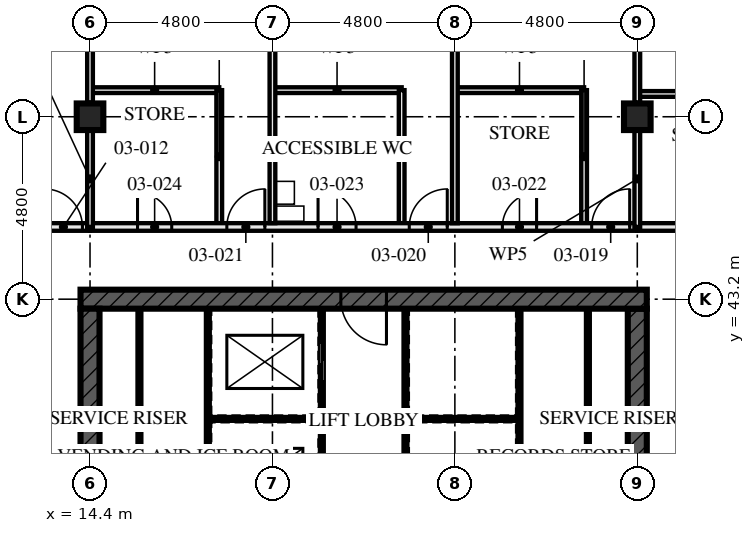
"""IFC4 building model, lengths in metres.
Left out: names, types, materials, properties, quantities, classifications, styles, units other than length and angle.
Written with IfcOpenShell. Run it as: python <this file> out.ifc"""

import sys

from ifc_helpers import new_model, si_unit, direction, frame, frame_2d, origin, origin_2d, place, context, subcontext, project, spatial, rectangle, hollow_rectangle, extrude, element, fill, save


model = new_model("IFC4")
c1 = context("Model", 3, precision=1e-05, world=origin(), true_north=direction((0.0, 1.0)))
c2 = subcontext(c1, "Body", "Model", "MODEL_VIEW")
j1 = project(units=[si_unit("LENGTHUNIT", "METRE"), si_unit("PLANEANGLEUNIT", "RADIAN")], contexts=[c1])
p1 = place(None, origin())
s1 = spatial("IfcSite", under=j1, at=p1, CompositionType="ELEMENT")
p2 = place(p1, origin())
s2 = spatial("IfcBuilding", under=s1, at=p2, CompositionType="ELEMENT")
p3 = place(p2, frame((0.0, 0.0, 13.5)))
s3 = spatial("IfcBuildingStorey", under=s2, at=p3, CompositionType="ELEMENT", Elevation=13.5)
for number, where, z_axis, x_axis in (
    (1, (14.4, 48.0, 0.0), (0.0, 0.0, 1.0), (1.0, 0.0, 0.0)),
    (2, (28.8, 48.0, 0.0), (0.0, 0.0, 1.0), (1.0, 0.0, 0.0)),
):
    element("IfcColumn", number, at=place(p3, frame(where, z_axis=z_axis, x_axis=x_axis)), inside=s3, PredefinedType="COLUMN", context=c2, shape_type="SweptSolid", body=[
        extrude(hollow_rectangle(XDim=0.7, YDim=0.7, WallThickness=0.06, at=origin_2d()), origin(), (0.0, 0.0, 1.0), 4.5),
    ])
p4 = place(p3, frame((29.05, 43.2, -0.17), z_axis=(0.0, 0.0, 1.0), x_axis=(-1.0, 0.0, 0.0)))
e3 = element("IfcWall", 3, at=p4, inside=s3, PredefinedType="SHEAR", context=c2, shape_type="SweptSolid", body=[
    extrude(rectangle(XDim=14.9, YDim=0.5, at=frame_2d((7.45, 0.0))), origin(), (0.0, 0.0, 1.0), 4.5),
])
p5 = place(p4, frame((6.85, 0.0, 0.17)))
e4 = element("IfcOpeningElement", 4, at=p5, cuts=e3, PredefinedType="OPENING", context=c2, shape_type="SweptSolid", body=[
    extrude(rectangle(XDim=1.2, YDim=2.1, at=frame_2d((0.6, 1.05))), frame((0.0, 0.26, 0.0), z_axis=(0.0, -1.0, 0.0), x_axis=(1.0, 0.0, 0.0)), (0.0, 0.0, 1.0), 0.521),
])
p6 = place(p3, frame((14.4, 42.95, -0.17), z_axis=(0.0, 0.0, 1.0), x_axis=(0.0, -1.0, 0.0)))
e5 = element("IfcWall", 5, at=p6, inside=s3, PredefinedType="SHEAR", context=c2, shape_type="SweptSolid", body=[
    extrude(rectangle(XDim=13.9, YDim=0.5, at=frame_2d((6.95, 0.0))), origin(), (0.0, 0.0, 1.0), 4.5),
])
p7 = place(p6, frame((6.35, 0.0, 0.17)))
e6 = element("IfcOpeningElement", 6, at=p7, cuts=e5, PredefinedType="OPENING", context=c2, shape_type="SweptSolid", body=[
    extrude(rectangle(XDim=1.2, YDim=2.1, at=frame_2d((0.6, 1.05))), frame((0.0, 0.26, 0.0), z_axis=(0.0, -1.0, 0.0), x_axis=(1.0, 0.0, 0.0)), (0.0, 0.0, 1.0), 0.521),
])
p8 = place(p3, frame((28.8, 29.05, -0.17), z_axis=(0.0, 0.0, 1.0), x_axis=(0.0, 1.0, 0.0)))
e7 = element("IfcWall", 7, at=p8, inside=s3, PredefinedType="SHEAR", context=c2, shape_type="SweptSolid", body=[
    extrude(rectangle(XDim=13.9, YDim=0.5, at=frame_2d((6.95, 0.0))), origin(), (0.0, 0.0, 1.0), 4.5),
])
p9 = place(p8, frame((6.35, 0.0, 0.17)))
e8 = element("IfcOpeningElement", 8, at=p9, cuts=e7, PredefinedType="OPENING", context=c2, shape_type="SweptSolid", body=[
    extrude(rectangle(XDim=1.2, YDim=2.1, at=frame_2d((0.6, 1.05))), frame((0.0, 0.26, 0.0), z_axis=(0.0, -1.0, 0.0), x_axis=(1.0, 0.0, 0.0)), (0.0, 0.0, 1.0), 0.521),
])
p10 = place(p3, frame((14.4, 45.1, 0.0), z_axis=(0.0, 0.0, 1.0), x_axis=(-1.0, 0.0, 0.0)))
e9 = element("IfcWall", 9, at=p10, inside=s3, PredefinedType="PARTITIONING", context=c2, shape_type="SweptSolid", body=[
    extrude(rectangle(XDim=14.855, YDim=0.2, at=frame_2d((7.427, 0.0))), origin(), (0.0, 0.0, 1.0), 3.32),
])
p11 = place(p10, frame((0.2, 0.0, 0.0)))
e10 = element("IfcOpeningElement", 10, at=p11, cuts=e9, PredefinedType="OPENING", context=c2, shape_type="SweptSolid", body=[
    extrude(rectangle(XDim=1.0, YDim=2.4, at=frame_2d((0.5, 1.2))), frame((0.0, 0.111, 0.0), z_axis=(0.0, -1.0, 0.0), x_axis=(1.0, 0.0, 0.0)), (0.0, 0.0, 1.0), 0.221),
])
p12 = place(p10, frame((5.0, 0.0, 0.0)))
e11 = element("IfcOpeningElement", 11, at=p12, cuts=e9, PredefinedType="OPENING", context=c2, shape_type="SweptSolid", body=[
    extrude(rectangle(XDim=1.0, YDim=2.4, at=frame_2d((0.5, 1.2))), frame((0.0, 0.111, 0.0), z_axis=(0.0, -1.0, 0.0), x_axis=(1.0, 0.0, 0.0)), (0.0, 0.0, 1.0), 0.221),
])
p13 = place(p10, frame((9.8, 0.0, 0.0)))
e12 = element("IfcOpeningElement", 12, at=p13, cuts=e9, PredefinedType="OPENING", context=c2, shape_type="SweptSolid", body=[
    extrude(rectangle(XDim=1.0, YDim=2.4, at=frame_2d((0.5, 1.2))), frame((0.0, 0.111, 0.0), z_axis=(0.0, -1.0, 0.0), x_axis=(1.0, 0.0, 0.0)), (0.0, 0.0, 1.0), 0.221),
])
p14 = place(p10, frame((2.65, 0.0, 0.0)))
e13 = element("IfcOpeningElement", 13, at=p14, cuts=e9, PredefinedType="OPENING", context=c2, shape_type="SweptSolid", body=[
    extrude(rectangle(XDim=0.9, YDim=2.1, at=frame_2d((0.45, 1.05))), frame((0.0, 0.111, 0.0), z_axis=(0.0, -1.0, 0.0), x_axis=(1.0, 0.0, 0.0)), (0.0, 0.0, 1.0), 0.221),
])
p15 = place(p10, frame((7.4, 0.0, 0.0)))
e14 = element("IfcOpeningElement", 14, at=p15, cuts=e9, PredefinedType="OPENING", context=c2, shape_type="SweptSolid", body=[
    extrude(rectangle(XDim=1.0, YDim=2.1, at=frame_2d((0.5, 1.05))), frame((0.0, 0.111, 0.0), z_axis=(0.0, -1.0, 0.0), x_axis=(1.0, 0.0, 0.0)), (0.0, 0.0, 1.0), 0.221),
])
p16 = place(p10, frame((12.25, 0.0, 0.0)))
e15 = element("IfcOpeningElement", 15, at=p16, cuts=e9, PredefinedType="OPENING", context=c2, shape_type="SweptSolid", body=[
    extrude(rectangle(XDim=0.9, YDim=2.1, at=frame_2d((0.45, 1.05))), frame((0.0, 0.111, 0.0), z_axis=(0.0, -1.0, 0.0), x_axis=(1.0, 0.0, 0.0)), (0.0, 0.0, 1.0), 0.221),
])
p17 = place(p3, frame((27.4, 48.7, 0.0), z_axis=(0.0, 0.0, 1.0), x_axis=(0.0, -1.0, 0.0)))
e16 = element("IfcWall", 16, at=p17, inside=s3, PredefinedType="PARTITIONING", context=c2, shape_type="SweptSolid", body=[
    extrude(rectangle(XDim=3.5, YDim=0.15, at=frame_2d((1.75, 0.0))), origin(), (0.0, 0.0, 1.0), 3.55),
])
p18 = place(p3, frame((27.4, 48.7, 0.0), z_axis=(0.0, 0.0, 1.0), x_axis=(-1.0, 0.0, 0.0)))
e17 = element("IfcWall", 17, at=p18, inside=s3, PredefinedType="PARTITIONING", context=c2, shape_type="SweptSolid", body=[
    extrude(rectangle(XDim=3.4, YDim=0.15, at=frame_2d((1.7, 0.0))), origin(), (0.0, 0.0, 1.0), 4.33),
])
p19 = place(p3, frame((22.6, 48.7, 0.0), z_axis=(0.0, 0.0, 1.0), x_axis=(0.0, -1.0, 0.0)))
e18 = element("IfcWall", 18, at=p19, inside=s3, PredefinedType="PARTITIONING", context=c2, shape_type="SweptSolid", body=[
    extrude(rectangle(XDim=3.5, YDim=0.15, at=frame_2d((1.75, 0.0))), origin(), (0.0, 0.0, 1.0), 3.55),
])
p20 = place(p3, frame((22.6, 48.7, 0.0), z_axis=(0.0, 0.0, 1.0), x_axis=(-1.0, 0.0, 0.0)))
e19 = element("IfcWall", 19, at=p20, inside=s3, PredefinedType="PARTITIONING", context=c2, shape_type="SweptSolid", body=[
    extrude(rectangle(XDim=3.4, YDim=0.15, at=frame_2d((1.7, 0.0))), origin(), (0.0, 0.0, 1.0), 4.33),
])
p21 = place(p3, frame((17.8, 48.7, 0.0), z_axis=(0.0, 0.0, 1.0), x_axis=(0.0, -1.0, 0.0)))
e20 = element("IfcWall", 20, at=p21, inside=s3, PredefinedType="PARTITIONING", context=c2, shape_type="SweptSolid", body=[
    extrude(rectangle(XDim=3.5, YDim=0.15, at=frame_2d((1.75, 0.0))), origin(), (0.0, 0.0, 1.0), 3.55),
])
p22 = place(p3, frame((17.8, 48.7, 0.0), z_axis=(0.0, 0.0, 1.0), x_axis=(-1.0, 0.0, 0.0)))
e21 = element("IfcWall", 21, at=p22, inside=s3, PredefinedType="PARTITIONING", context=c2, shape_type="SweptSolid", body=[
    extrude(rectangle(XDim=3.4, YDim=0.15, at=frame_2d((1.7, 0.0))), origin(), (0.0, 0.0, 1.0), 4.33),
])
for number, where, z_axis, x_axis in (
    (22, (24.0, 57.255, 0.0), (0.0, 0.0, 1.0), (0.0, -1.0, 0.0)),
    (23, (19.2, 57.255, 0.0), (0.0, 0.0, 1.0), (0.0, -1.0, 0.0)),
):
    element("IfcWall", number, at=place(p3, frame(where, z_axis=z_axis, x_axis=x_axis)), inside=s3, PredefinedType="PARTITIONING", context=c2, shape_type="SweptSolid", body=[
        extrude(rectangle(XDim=12.055, YDim=0.15, at=frame_2d((6.027, 0.0))), origin(), (0.0, 0.0, 1.0), 3.55),
    ])
p23 = place(p3, frame((28.8, 45.1, 0.0), z_axis=(0.0, 0.0, 1.0), x_axis=(-1.0, 0.0, 0.0)))
e24 = element("IfcWall", 24, at=p23, inside=s3, PredefinedType="PARTITIONING", context=c2, shape_type="SweptSolid", body=[
    extrude(rectangle(XDim=14.4, YDim=0.2, at=frame_2d((7.2, 0.0))), origin(), (0.0, 0.0, 1.0), 4.33),
])
p24 = place(p23, frame((0.2, 0.0, 0.0)))
e25 = element("IfcOpeningElement", 25, at=p24, cuts=e24, PredefinedType="OPENING", context=c2, shape_type="SweptSolid", body=[
    extrude(rectangle(XDim=1.0, YDim=2.4, at=frame_2d((0.5, 1.2))), frame((0.0, 0.111, 0.0), z_axis=(0.0, -1.0, 0.0), x_axis=(1.0, 0.0, 0.0)), (0.0, 0.0, 1.0), 0.221),
])
p25 = place(p23, frame((5.0, 0.0, 0.0)))
e26 = element("IfcOpeningElement", 26, at=p25, cuts=e24, PredefinedType="OPENING", context=c2, shape_type="SweptSolid", body=[
    extrude(rectangle(XDim=1.0, YDim=2.4, at=frame_2d((0.5, 1.2))), frame((0.0, 0.111, 0.0), z_axis=(0.0, -1.0, 0.0), x_axis=(1.0, 0.0, 0.0)), (0.0, 0.0, 1.0), 0.221),
])
p26 = place(p23, frame((9.8, 0.0, 0.0)))
e27 = element("IfcOpeningElement", 27, at=p26, cuts=e24, PredefinedType="OPENING", context=c2, shape_type="SweptSolid", body=[
    extrude(rectangle(XDim=1.0, YDim=2.4, at=frame_2d((0.5, 1.2))), frame((0.0, 0.111, 0.0), z_axis=(0.0, -1.0, 0.0), x_axis=(1.0, 0.0, 0.0)), (0.0, 0.0, 1.0), 0.221),
])
p27 = place(p23, frame((2.65, 0.0, 0.0)))
e28 = element("IfcOpeningElement", 28, at=p27, cuts=e24, PredefinedType="OPENING", context=c2, shape_type="SweptSolid", body=[
    extrude(rectangle(XDim=0.9, YDim=2.1, at=frame_2d((0.45, 1.05))), frame((0.0, 0.111, 0.0), z_axis=(0.0, -1.0, 0.0), x_axis=(1.0, 0.0, 0.0)), (0.0, 0.0, 1.0), 0.221),
])
p28 = place(p23, frame((7.4, 0.0, 0.0)))
e29 = element("IfcOpeningElement", 29, at=p28, cuts=e24, PredefinedType="OPENING", context=c2, shape_type="SweptSolid", body=[
    extrude(rectangle(XDim=1.0, YDim=2.1, at=frame_2d((0.5, 1.05))), frame((0.0, 0.111, 0.0), z_axis=(0.0, -1.0, 0.0), x_axis=(1.0, 0.0, 0.0)), (0.0, 0.0, 1.0), 0.221),
])
p29 = place(p23, frame((12.25, 0.0, 0.0)))
e30 = element("IfcOpeningElement", 30, at=p29, cuts=e24, PredefinedType="OPENING", context=c2, shape_type="SweptSolid", body=[
    extrude(rectangle(XDim=0.9, YDim=2.1, at=frame_2d((0.45, 1.05))), frame((0.0, 0.111, 0.0), z_axis=(0.0, -1.0, 0.0), x_axis=(1.0, 0.0, 0.0)), (0.0, 0.0, 1.0), 0.221),
])
p30 = place(p3, frame((32.2, 48.6, 0.0), z_axis=(0.0, 0.0, 1.0), x_axis=(-1.0, 0.0, 0.0)))
e31 = element("IfcWall", 31, at=p30, inside=s3, PredefinedType="PARTITIONING", context=c2, shape_type="SweptSolid", body=[
    extrude(rectangle(XDim=3.4, YDim=0.15, at=frame_2d((1.7, 0.0))), origin(), (0.0, 0.0, 1.0), 4.33),
])
p31 = place(p3, frame((43.655, 45.1, 0.0), z_axis=(0.0, 0.0, 1.0), x_axis=(-1.0, 0.0, 0.0)))
e32 = element("IfcWall", 32, at=p31, inside=s3, PredefinedType="PARTITIONING", context=c2, shape_type="SweptSolid", body=[
    extrude(rectangle(XDim=14.855, YDim=0.2, at=frame_2d((7.427, 0.0))), origin(), (0.0, 0.0, 1.0), 3.32),
])
p32 = place(p31, frame((0.655, 0.0, 0.0)))
e33 = element("IfcOpeningElement", 33, at=p32, cuts=e32, PredefinedType="OPENING", context=c2, shape_type="SweptSolid", body=[
    extrude(rectangle(XDim=1.0, YDim=2.4, at=frame_2d((0.5, 1.2))), frame((0.0, 0.111, 0.0), z_axis=(0.0, -1.0, 0.0), x_axis=(1.0, 0.0, 0.0)), (0.0, 0.0, 1.0), 0.221),
])
p33 = place(p31, frame((5.455, 0.0, 0.0)))
e34 = element("IfcOpeningElement", 34, at=p33, cuts=e32, PredefinedType="OPENING", context=c2, shape_type="SweptSolid", body=[
    extrude(rectangle(XDim=1.0, YDim=2.4, at=frame_2d((0.5, 1.2))), frame((0.0, 0.111, 0.0), z_axis=(0.0, -1.0, 0.0), x_axis=(1.0, 0.0, 0.0)), (0.0, 0.0, 1.0), 0.221),
])
p34 = place(p31, frame((10.255, 0.0, 0.0)))
e35 = element("IfcOpeningElement", 35, at=p34, cuts=e32, PredefinedType="OPENING", context=c2, shape_type="SweptSolid", body=[
    extrude(rectangle(XDim=1.0, YDim=2.4, at=frame_2d((0.5, 1.2))), frame((0.0, 0.111, 0.0), z_axis=(0.0, -1.0, 0.0), x_axis=(1.0, 0.0, 0.0)), (0.0, 0.0, 1.0), 0.221),
])
p35 = place(p31, frame((3.105, 0.0, 0.0)))
e36 = element("IfcOpeningElement", 36, at=p35, cuts=e32, PredefinedType="OPENING", context=c2, shape_type="SweptSolid", body=[
    extrude(rectangle(XDim=0.9, YDim=2.1, at=frame_2d((0.45, 1.05))), frame((0.0, 0.111, 0.0), z_axis=(0.0, -1.0, 0.0), x_axis=(1.0, 0.0, 0.0)), (0.0, 0.0, 1.0), 0.221),
])
p36 = place(p31, frame((7.855, 0.0, 0.0)))
e37 = element("IfcOpeningElement", 37, at=p36, cuts=e32, PredefinedType="OPENING", context=c2, shape_type="SweptSolid", body=[
    extrude(rectangle(XDim=1.0, YDim=2.1, at=frame_2d((0.5, 1.05))), frame((0.0, 0.111, 0.0), z_axis=(0.0, -1.0, 0.0), x_axis=(1.0, 0.0, 0.0)), (0.0, 0.0, 1.0), 0.221),
])
p37 = place(p31, frame((12.705, 0.0, 0.0)))
e38 = element("IfcOpeningElement", 38, at=p37, cuts=e32, PredefinedType="OPENING", context=c2, shape_type="SweptSolid", body=[
    extrude(rectangle(XDim=0.9, YDim=2.1, at=frame_2d((0.45, 1.05))), frame((0.0, 0.111, 0.0), z_axis=(0.0, -1.0, 0.0), x_axis=(1.0, 0.0, 0.0)), (0.0, 0.0, 1.0), 0.221),
])
for number, where, z_axis, x_axis in (
    (39, (15.7, 37.15, 0.0), (0.0, 0.0, 1.0), (0.0, 1.0, 0.0)),
    (40, (27.5, 37.15, 0.0), (0.0, 0.0, 1.0), (0.0, 1.0, 0.0)),
):
    element("IfcWall", number, at=place(p3, frame(where, z_axis=z_axis, x_axis=x_axis)), inside=s3, PredefinedType="SOLIDWALL", context=c2, shape_type="SweptSolid", body=[
        extrude(rectangle(XDim=5.8, YDim=0.1, at=frame_2d((2.9, 0.0))), origin(), (0.0, 0.0, 1.0), 4.33),
    ])
p38 = place(p3, frame((20.5, 37.15, 0.0), z_axis=(0.0, 0.0, 1.0), x_axis=(0.0, 1.0, 0.0)))
e41 = element("IfcWall", 41, at=p38, inside=s3, PredefinedType="SOLIDWALL", context=c2, shape_type="SweptSolid", body=[
    extrude(rectangle(XDim=5.8, YDim=0.1, at=frame_2d((2.9, 0.0))), origin(), (0.0, 0.0, 1.0), 4.33),
])
p39 = place(p38, frame((0.925, 0.0, 0.0)))
e42 = element("IfcOpeningElement", 42, at=p39, cuts=e41, PredefinedType="OPENING", context=c2, shape_type="SweptSolid", body=[
    extrude(rectangle(XDim=1.0, YDim=2.1, at=frame_2d((0.5, 1.05))), frame((0.0, 0.061, 0.0), z_axis=(0.0, -1.0, 0.0), x_axis=(1.0, 0.0, 0.0)), (0.0, 0.0, 1.0), 0.121),
])
p40 = place(p38, frame((3.9, 0.0, 0.0)))
e43 = element("IfcOpeningElement", 43, at=p40, cuts=e41, PredefinedType="OPENING", context=c2, shape_type="SweptSolid", body=[
    extrude(rectangle(XDim=1.0, YDim=2.1, at=frame_2d((0.5, 1.05))), frame((0.0, 0.061, 0.0), z_axis=(0.0, -1.0, 0.0), x_axis=(1.0, 0.0, 0.0)), (0.0, 0.0, 1.0), 0.121),
])
for number, where, z_axis, x_axis in (
    (44, (22.7, 37.15, 0.0), (0.0, 0.0, 1.0), (0.0, 1.0, 0.0)),
    (45, (17.5, 37.15, 0.0), (0.0, 0.0, 1.0), (0.0, 1.0, 0.0)),
):
    element("IfcWall", number, at=place(p3, frame(where, z_axis=z_axis, x_axis=x_axis)), inside=s3, PredefinedType="SOLIDWALL", context=c2, shape_type="SweptSolid", body=[
        extrude(rectangle(XDim=5.8, YDim=0.1, at=frame_2d((2.9, 0.0))), origin(), (0.0, 0.0, 1.0), 4.33),
    ])
for number, where, z_axis, x_axis in (
    (46, (17.55, 40.05, 0.0), (0.0, 0.0, 1.0), (1.0, 0.0, 0.0)),
    (47, (22.75, 40.05, 0.0), (0.0, 0.0, 1.0), (1.0, 0.0, 0.0)),
):
    element("IfcWall", number, at=place(p3, frame(where, z_axis=z_axis, x_axis=x_axis)), inside=s3, PredefinedType="SOLIDWALL", context=c2, shape_type="SweptSolid", body=[
        extrude(rectangle(XDim=2.9, YDim=0.1, at=frame_2d((1.45, 0.0))), origin(), (0.0, 0.0, 1.0), 4.33),
    ])
p41 = place(p3, frame((25.7, 37.15, 0.0), z_axis=(0.0, 0.0, 1.0), x_axis=(0.0, 1.0, 0.0)))
e48 = element("IfcWall", 48, at=p41, inside=s3, PredefinedType="SOLIDWALL", context=c2, shape_type="SweptSolid", body=[
    extrude(rectangle(XDim=5.8, YDim=0.1, at=frame_2d((2.9, 0.0))), origin(), (0.0, 0.0, 1.0), 4.33),
])
p42 = place(p3, frame((14.4, 45.1, 0.0), z_axis=(0.0, 0.0, 1.0), x_axis=(0.0, 1.0, 0.0)))
e49 = element("IfcWall", 49, at=p42, inside=s3, PredefinedType="PARTITIONING", context=c2, shape_type="SweptSolid", body=[
    extrude(rectangle(XDim=2.53, YDim=0.15, at=frame_2d((1.265, 0.0))), origin(), (0.0, 0.0, 1.0), 3.32),
])
p43 = place(p3, frame((14.4, 48.37, 0.0), z_axis=(0.0, 0.0, 1.0), x_axis=(0.0, 1.0, 0.0)))
e50 = element("IfcWall", 50, at=p43, inside=s3, PredefinedType="PARTITIONING", context=c2, shape_type="SweptSolid", body=[
    extrude(rectangle(XDim=4.06, YDim=0.15, at=frame_2d((2.03, 0.0))), origin(), (0.0, 0.0, 1.0), 3.32),
])
p44 = place(p3, frame((28.8, 45.1, 0.0), z_axis=(0.0, 0.0, 1.0), x_axis=(0.0, 1.0, 0.0)))
e51 = element("IfcWall", 51, at=p44, inside=s3, PredefinedType="PARTITIONING", context=c2, shape_type="SweptSolid", body=[
    extrude(rectangle(XDim=2.53, YDim=0.15, at=frame_2d((1.265, 0.0))), origin(), (0.0, 0.0, 1.0), 3.32),
])
p45 = place(p3, frame((28.8, 48.37, 0.0), z_axis=(0.0, 0.0, 1.0), x_axis=(0.0, 1.0, 0.0)))
e52 = element("IfcWall", 52, at=p45, inside=s3, PredefinedType="PARTITIONING", context=c2, shape_type="SweptSolid", body=[
    extrude(rectangle(XDim=4.06, YDim=0.15, at=frame_2d((2.03, 0.0))), origin(), (0.0, 0.0, 1.0), 3.32),
])
p46 = place(p11, frame((1.0, 0.0, 0.0), z_axis=(0.0, 0.0, 1.0), x_axis=(-1.0, 0.0, 0.0)))
e53 = element("IfcDoor", 53, at=p46, inside=s3, OperationType="SINGLE_SWING_RIGHT", PredefinedType="DOOR", context=c2, shape_type="SweptSolid", body=[
    extrude(rectangle(XDim=1.0, YDim=2.4, at=frame_2d((0.5, 1.2))), frame((0.0, 0.027, 0.0), z_axis=(0.0, -1.0, 0.0), x_axis=(1.0, 0.0, 0.0)), (0.0, 0.0, 1.0), 0.054),
])
fill(e10, e53)
p47 = place(p24, frame((1.0, 0.0, 0.0), z_axis=(0.0, 0.0, 1.0), x_axis=(-1.0, 0.0, 0.0)))
e54 = element("IfcDoor", 54, at=p47, inside=s3, OperationType="SINGLE_SWING_LEFT", PredefinedType="DOOR", context=c2, shape_type="SweptSolid", body=[
    extrude(rectangle(XDim=1.0, YDim=2.4, at=frame_2d((0.5, 1.2))), frame((0.0, 0.027, 0.0), z_axis=(0.0, -1.0, 0.0), x_axis=(1.0, 0.0, 0.0)), (0.0, 0.0, 1.0), 0.054),
])
fill(e25, e54)
p48 = place(p25, frame((1.0, 0.0, 0.0), z_axis=(0.0, 0.0, 1.0), x_axis=(-1.0, 0.0, 0.0)))
e55 = element("IfcDoor", 55, at=p48, inside=s3, OperationType="SINGLE_SWING_LEFT", PredefinedType="DOOR", context=c2, shape_type="SweptSolid", body=[
    extrude(rectangle(XDim=1.0, YDim=2.4, at=frame_2d((0.5, 1.2))), frame((0.0, 0.027, 0.0), z_axis=(0.0, -1.0, 0.0), x_axis=(1.0, 0.0, 0.0)), (0.0, 0.0, 1.0), 0.054),
])
fill(e26, e55)
p49 = place(p26, frame((1.0, 0.0, 0.0), z_axis=(0.0, 0.0, 1.0), x_axis=(-1.0, 0.0, 0.0)))
e56 = element("IfcDoor", 56, at=p49, inside=s3, OperationType="SINGLE_SWING_LEFT", PredefinedType="DOOR", context=c2, shape_type="SweptSolid", body=[
    extrude(rectangle(XDim=1.0, YDim=2.4, at=frame_2d((0.5, 1.2))), frame((0.0, 0.027, 0.0), z_axis=(0.0, -1.0, 0.0), x_axis=(1.0, 0.0, 0.0)), (0.0, 0.0, 1.0), 0.054),
])
fill(e27, e56)
p50 = place(p27, frame((0.9, 0.0, 0.0), z_axis=(0.0, 0.0, 1.0), x_axis=(-1.0, 0.0, 0.0)))
e57 = element("IfcDoor", 57, at=p50, inside=s3, OperationType="SINGLE_SWING_LEFT", PredefinedType="DOOR", context=c2, shape_type="SweptSolid", body=[
    extrude(rectangle(XDim=0.9, YDim=2.1, at=frame_2d((0.45, 1.05))), frame((0.0, 0.027, 0.0), z_axis=(0.0, -1.0, 0.0), x_axis=(1.0, 0.0, 0.0)), (0.0, 0.0, 1.0), 0.054),
])
fill(e28, e57)
p51 = place(p28, frame((1.0, 0.0, 0.0), z_axis=(0.0, 0.0, 1.0), x_axis=(-1.0, 0.0, 0.0)))
e58 = element("IfcDoor", 58, at=p51, inside=s3, OperationType="SINGLE_SWING_RIGHT", PredefinedType="DOOR", context=c2, shape_type="SweptSolid", body=[
    extrude(rectangle(XDim=1.0, YDim=2.1, at=frame_2d((0.5, 1.05))), frame((0.0, 0.027, 0.0), z_axis=(0.0, -1.0, 0.0), x_axis=(1.0, 0.0, 0.0)), (0.0, 0.0, 1.0), 0.054),
])
fill(e29, e58)
p52 = place(p29, frame((0.9, 0.0, 0.0), z_axis=(0.0, 0.0, 1.0), x_axis=(-1.0, 0.0, 0.0)))
e59 = element("IfcDoor", 59, at=p52, inside=s3, OperationType="SINGLE_SWING_RIGHT", PredefinedType="DOOR", context=c2, shape_type="SweptSolid", body=[
    extrude(rectangle(XDim=0.9, YDim=2.1, at=frame_2d((0.45, 1.05))), frame((0.0, 0.027, 0.0), z_axis=(0.0, -1.0, 0.0), x_axis=(1.0, 0.0, 0.0)), (0.0, 0.0, 1.0), 0.054),
])
fill(e30, e59)
p53 = place(p40, origin())
e60 = element("IfcDoor", 60, at=p53, inside=s3, OperationType="SLIDING_TO_LEFT", PredefinedType="DOOR", context=c2, shape_type="SweptSolid", body=[
    extrude(rectangle(XDim=1.0, YDim=2.1, at=frame_2d((0.5, 1.05))), frame((0.0, 0.05, 0.0), z_axis=(0.0, -1.0, 0.0), x_axis=(1.0, 0.0, 0.0)), (0.0, 0.0, 1.0), 0.1),
])
fill(e43, e60)
p54 = place(p5, origin())
e61 = element("IfcDoor", 61, at=p54, inside=s3, OperationType="SINGLE_SWING_LEFT", PredefinedType="DOOR", context=c2, shape_type="SweptSolid", body=[
    extrude(rectangle(XDim=1.2, YDim=2.1, at=frame_2d((0.6, 1.05))), frame((0.0, 0.027, 0.0), z_axis=(0.0, -1.0, 0.0), x_axis=(1.0, 0.0, 0.0)), (0.0, 0.0, 1.0), 0.054),
])
fill(e4, e61)
save(model, sys.argv[1])
